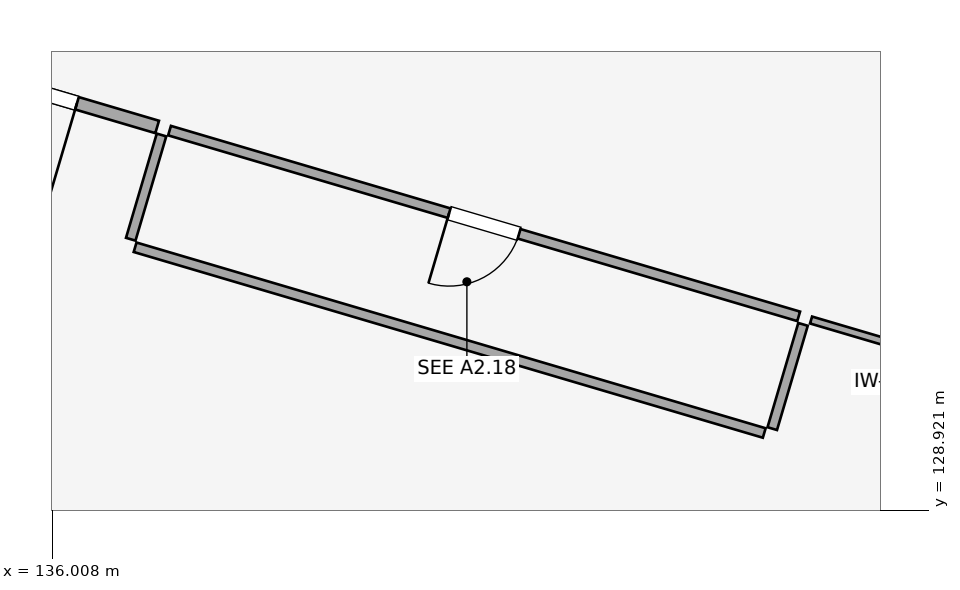
"""IFC4 building model, lengths in metres.
Left out: names, types, materials, properties, quantities, classifications, styles, units other than length and angle.
Written with IfcOpenShell. Run it as: python <this file> out.ifc"""

import sys

from ifc_helpers import new_model, si_unit, direction, frame, frame_2d, origin, place, context, subcontext, project, spatial, rectangle, extrude, element, fill, save


model = new_model("IFC4")
c1 = context("Model", 3, precision=1e-05, world=origin(), true_north=direction((0.0, 1.0)))
c2 = subcontext(c1, "Body", "Model", "MODEL_VIEW")
j1 = project(units=[si_unit("LENGTHUNIT", "METRE"), si_unit("PLANEANGLEUNIT", "RADIAN")], contexts=[c1])
p1 = place(None, origin())
s1 = spatial("IfcSite", under=j1, at=p1, CompositionType="ELEMENT")
p2 = place(p1, origin())
s2 = spatial("IfcBuilding", under=s1, at=p2, CompositionType="ELEMENT")
p3 = place(p2, origin())
s3 = spatial("IfcBuildingStorey", under=s2, at=p3, CompositionType="ELEMENT", Elevation=0.0)
p4 = place(p3, frame((140.341, 119.987, 0.0), z_axis=(0.0, 0.0, 1.0), x_axis=(0.61155793071, 0.791199657094, 0.0)))
e1 = element("IfcWall", 1, at=p4, inside=s3, PredefinedType="PARTITIONING", context=c2, shape_type="SweptSolid", body=[
    extrude(rectangle(XDim=13.402, YDim=0.14, at=frame_2d((6.701, 0.0))), origin(), (0.0, 0.0, 1.0), 3.69),
])
p5 = place(p3, frame((145.822, 131.474, 0.0), z_axis=(0.0, 0.0, 1.0), x_axis=(-0.959075342625, 0.283150997119, 0.0)))
e2 = element("IfcWall", 2, at=p5, inside=s3, PredefinedType="PARTITIONING", context=c2, shape_type="SweptSolid", body=[
    extrude(rectangle(XDim=8.63, YDim=0.13, at=frame_2d((4.315, 0.0))), origin(), (0.0, 0.0, 1.0), 3.69),
])
p6 = place(p5, frame((3.835, 0.0, 0.0)))
e3 = element("IfcOpeningElement", 3, at=p6, cuts=e2, PredefinedType="OPENING", context=c2, shape_type="SweptSolid", body=[
    extrude(rectangle(XDim=0.96, YDim=2.24, at=frame_2d((0.48, 1.12))), frame((0.0, 0.075, 0.0), z_axis=(0.0, -1.0, 0.0), x_axis=(1.0, 0.0, 0.0)), (0.0, 0.0, 1.0), 0.15),
])
p7 = place(p3, frame((145.369, 129.94, 0.0), z_axis=(0.0, 0.0, 1.0), x_axis=(-0.959075342625, 0.283150997119, 0.0)))
e4 = element("IfcWall", 4, at=p7, inside=s3, PredefinedType="PARTITIONING", context=c2, shape_type="SweptSolid", body=[
    extrude(rectangle(XDim=8.63, YDim=0.13, at=frame_2d((4.315, 0.0))), origin(), (0.0, 0.0, 1.0), 3.69),
])
for number, where, z_axis, x_axis in (
    (5, (145.879, 131.369, 0.0), (0.0, 0.0, 1.0), (-0.283, -0.959, 0.0)),
    (6, (137.44, 133.86, 0.0), (0.0, 0.0, 1.0), (-0.283, -0.959, 0.0)),
):
    element("IfcWall", number, at=place(p3, frame(where, z_axis=z_axis, x_axis=x_axis)), inside=s3, PredefinedType="PARTITIONING", context=c2, shape_type="SweptSolid", body=[
        extrude(rectangle(XDim=1.43, YDim=0.13, at=frame_2d((0.715, 0.0))), origin(), (0.0, 0.0, 1.0), 3.69),
    ])
p8 = place(p3, frame((148.508, 130.681, 0.0), z_axis=(0.0, 0.0, 1.0), x_axis=(-0.959084181635, 0.283121056329, 0.0)))
e7 = element("IfcWall", 7, at=p8, inside=s3, PredefinedType="MOVABLE", context=c2, shape_type="SweptSolid", body=[
    extrude(rectangle(XDim=2.63, YDim=0.095, at=frame_2d((1.315, 0.0))), origin(), (0.0, 0.0, 1.0), 3.69),
])
p9 = place(p3, frame((137.382, 133.966, 0.0), z_axis=(0.0, 0.0, 1.0), x_axis=(-0.959077382298, 0.283144088345, 0.0)))
e8 = element("IfcWall", 8, at=p9, inside=s3, PredefinedType="PARTITIONING", context=c2, shape_type="SweptSolid", body=[
    extrude(rectangle(XDim=8.461, YDim=0.17, at=frame_2d((4.23, 0.0))), origin(), (0.0, 0.0, 1.0), 3.69),
])
p10 = place(p9, frame((1.1, 0.0, 0.0)))
e9 = element("IfcOpeningElement", 9, at=p10, cuts=e8, PredefinedType="OPENING", context=c2, shape_type="SweptSolid", body=[
    extrude(rectangle(XDim=1.82, YDim=2.38, at=frame_2d((0.91, 1.19))), frame((0.0, 0.095, 0.0), z_axis=(0.0, -1.0, 0.0), x_axis=(1.0, 0.0, 0.0)), (0.0, 0.0, 1.0), 0.19),
])
p11 = place(p6, origin())
e10 = element("IfcDoor", 10, at=p11, inside=s3, OperationType="SINGLE_SWING_RIGHT", PredefinedType="DOOR", context=c2, shape_type="SweptSolid", body=[
    extrude(rectangle(XDim=0.96, YDim=2.24, at=frame_2d((0.48, 1.12))), frame((0.0, 0.025, 0.0), z_axis=(0.0, -1.0, 0.0), x_axis=(1.0, 0.0, 0.0)), (0.0, 0.0, 1.0), 0.05),
])
fill(e3, e10)
p12 = place(p10, origin())
e11 = element("IfcDoor", 11, at=p12, inside=s3, OperationType="SINGLE_SWING_LEFT", PredefinedType="DOOR", context=c2, shape_type="SweptSolid", body=[
    extrude(rectangle(XDim=1.82, YDim=2.38, at=frame_2d((0.91, 1.19))), frame((0.0, 0.025, 0.0), z_axis=(0.0, -1.0, 0.0), x_axis=(1.0, 0.0, 0.0)), (0.0, 0.0, 1.0), 0.05),
])
fill(e9, e11)
save(model, sys.argv[1])
